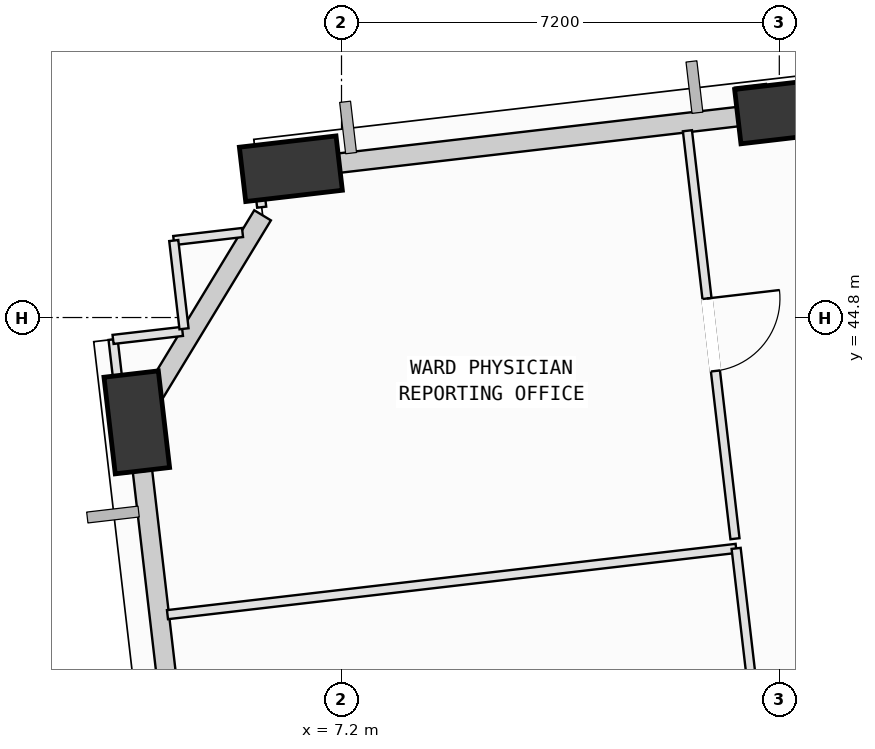
"""IFC4 building model, lengths in metres.
Left out: names, types, materials, properties, quantities, classifications, styles, units other than length and angle.
Written with IfcOpenShell. Run it as: python <this file> out.ifc"""

import sys

from ifc_helpers import new_model, si_unit, direction, frame, frame_2d, origin, origin_2d, place, context, subcontext, project, spatial, rectangle, extrude, element, fill, save


model = new_model("IFC4")
c1 = context("Model", 3, precision=1e-05, world=origin(), true_north=direction((0.0, 1.0)))
c2 = subcontext(c1, "Body", "Model", "MODEL_VIEW")
j1 = project(units=[si_unit("LENGTHUNIT", "METRE"), si_unit("PLANEANGLEUNIT", "RADIAN")], contexts=[c1])
p1 = place(None, origin())
s1 = spatial("IfcSite", under=j1, at=p1, CompositionType="ELEMENT")
p2 = place(p1, origin())
s2 = spatial("IfcBuilding", under=s1, at=p2, CompositionType="ELEMENT")
p3 = place(p2, frame((0.0, 0.0, 51.0)))
s3 = spatial("IfcBuildingStorey", under=s2, at=p3, CompositionType="ELEMENT", Elevation=51.0)
p4 = place(p3, frame((14.512, 48.197, 0.002), z_axis=(-0.095588978911, -0.079283693352, 0.992258455786), x_axis=(0.722555490387, -0.691163316507, 0.014381697639)))
e1 = element("IfcColumn", 1, at=p4, inside=s3, PredefinedType="COLUMN", context=c2, shape_type="SweptSolid", body=[
    extrude(rectangle(XDim=1.6, YDim=0.9, at=origin_2d()), origin(), (0.0, 0.0, 1.0), 4.028),
])
p5 = place(p3, frame((6.367, 47.247, 0.002), z_axis=(-0.091149766774, -0.112426104907, 0.989470611465), x_axis=(0.843714251314, -0.536530836824, 0.016760765699)))
e2 = element("IfcColumn", 2, at=p5, inside=s3, PredefinedType="COLUMN", context=c2, shape_type="SweptSolid", body=[
    extrude(rectangle(XDim=1.6, YDim=0.9, at=origin_2d()), origin(), (0.0, 0.0, 1.0), 4.039),
])
p6 = place(p3, frame((3.833, 43.076, 0.002), z_axis=(-0.073999121688, -0.122727301492, 0.989677795779), x_axis=(0.408416071098, 0.901628458186, 0.142346184554)))
e3 = element("IfcColumn", 3, at=p6, inside=s3, PredefinedType="COLUMN", context=c2, shape_type="SweptSolid", body=[
    extrude(rectangle(XDim=1.6, YDim=0.9, at=origin_2d()), origin(), (0.0, 0.0, 1.0), 4.038),
])
p7 = place(p3, frame((6.728, 47.289, 0.0), z_axis=(0.0, 0.0, 1.0), x_axis=(0.993271125932, 0.115812220379, 0.0)))
e4 = element("IfcWall", 4, at=p7, inside=s3, PredefinedType="SOLIDWALL", context=c2, shape_type="SweptSolid", body=[
    extrude(rectangle(XDim=7.035, YDim=0.32, at=frame_2d((3.517, 0.0))), origin(), (0.0, 0.0, 1.0), 3.165),
])
p8 = place(p3, frame((3.999, 43.348, 0.0), z_axis=(0.0, 0.0, 1.0), x_axis=(0.519169277359, 0.85467143479, 0.0)))
e5 = element("IfcWall", 5, at=p8, inside=s3, PredefinedType="SOLIDWALL", context=c2, shape_type="SweptSolid", body=[
    extrude(rectangle(XDim=3.666, YDim=0.32, at=frame_2d((1.833, 0.0))), origin(), (0.0, 0.0, 1.0), 3.165),
])
p9 = place(p3, frame((4.532, 37.083, 0.0), z_axis=(0.0, 0.0, 1.0), x_axis=(-0.11578615957, 0.993274164192, 0.0)))
e6 = element("IfcWall", 6, at=p9, inside=s3, PredefinedType="SOLIDWALL", context=c2, shape_type="SweptSolid", body=[
    extrude(rectangle(XDim=5.223, YDim=0.32, at=frame_2d((2.611, 0.0))), origin(), (0.0, 0.0, 1.0), 3.165),
])
p10 = place(p9, frame((0.715, 0.0, 0.75)))
e7 = element("IfcOpeningElement", 7, at=p10, cuts=e6, PredefinedType="OPENING", context=c2, shape_type="SweptSolid", body=[
    extrude(rectangle(XDim=1.2, YDim=1.75, at=frame_2d((0.6, 0.875))), frame((0.0, 0.17, 0.0), z_axis=(0.0, -1.0, 0.0), x_axis=(1.0, 0.0, 0.0)), (0.0, 0.0, 1.0), 0.34),
])
p11 = place(p3, frame((4.338, 39.913, 0.0), z_axis=(0.0, 0.0, 1.0), x_axis=(0.993278152999, 0.11575193638, 0.0)))
e8 = element("IfcWall", 8, at=p11, inside=s3, PredefinedType="PARTITIONING", context=c2, shape_type="SweptSolid", body=[
    extrude(rectangle(XDim=9.415, YDim=0.15, at=frame_2d((4.708, 0.0))), origin(), (0.0, 0.0, 1.0), 3.78),
])
p12 = place(p3, frame((13.69, 41.003, 0.0), z_axis=(0.0, 0.0, 1.0), x_axis=(0.11578306798, -0.993274524575, 0.0)))
e9 = element("IfcWall", 9, at=p12, inside=s3, PredefinedType="PARTITIONING", context=c2, shape_type="SweptSolid", body=[
    extrude(rectangle(XDim=13.24, YDim=0.15, at=frame_2d((6.62, 0.0))), origin(), (0.0, 0.0, 1.0), 2.865),
])
p13 = place(p12, frame((6.02, 0.0, 0.0)))
e10 = element("IfcOpeningElement", 10, at=p13, cuts=e9, PredefinedType="OPENING", context=c2, shape_type="SweptSolid", body=[
    extrude(rectangle(XDim=1.2, YDim=2.15, at=frame_2d((0.6, 1.075))), frame((0.0, 0.085, 0.0), z_axis=(0.0, -1.0, 0.0), x_axis=(1.0, 0.0, 0.0)), (0.0, 0.0, 1.0), 0.17),
])
p14 = place(p3, frame((4.441, 46.066, 0.0), z_axis=(0.0, 0.0, 1.0), x_axis=(0.993251207163, 0.115982927493, 0.0)))
e11 = element("IfcWall", 11, at=p14, inside=s3, PredefinedType="PARTITIONING", context=c2, shape_type="SweptSolid", body=[
    extrude(rectangle(XDim=1.139, YDim=0.15, at=frame_2d((0.569, 0.0))), origin(), (0.0, 0.0, 1.0), 3.78),
])
p15 = place(p3, frame((5.887, 46.615, 0.0), z_axis=(0.0, 0.0, 1.0), x_axis=(-0.115659183941, 0.99328895754, 0.0)))
e12 = element("IfcWall", 12, at=p15, inside=s3, PredefinedType="PARTITIONING", context=c2, shape_type="SweptSolid", body=[
    extrude(rectangle(XDim=0.743, YDim=0.15, at=frame_2d((0.372, 0.0))), origin(), (0.0, 0.0, 1.0), 3.78),
])
p16 = place(p3, frame((5.801, 47.353, 0.0), z_axis=(0.0, 0.0, 1.0), x_axis=(0.993245176119, 0.116034564316, 0.0)))
e13 = element("IfcWall", 13, at=p16, inside=s3, PredefinedType="PARTITIONING", context=c2, shape_type="SweptSolid", body=[
    extrude(rectangle(XDim=0.913, YDim=0.15, at=frame_2d((0.457, 0.0))), origin(), (0.0, 0.0, 1.0), 3.78),
])
p17 = place(p3, frame((12.889, 47.872, 0.0), z_axis=(0.0, 0.0, 1.0), x_axis=(0.115757094982, -0.993277551826, 0.0)))
e14 = element("IfcWall", 14, at=p17, inside=s3, PredefinedType="PARTITIONING", context=c2, shape_type="SweptSolid", body=[
    extrude(rectangle(XDim=6.755, YDim=0.15, at=frame_2d((3.378, 0.0))), origin(), (0.0, 0.0, 1.0), 2.865),
])
p18 = place(p17, frame((2.778, 0.0, 0.0)))
e15 = element("IfcOpeningElement", 15, at=p18, cuts=e14, PredefinedType="OPENING", context=c2, shape_type="SweptSolid", body=[
    extrude(rectangle(XDim=1.2, YDim=2.15, at=frame_2d((0.6, 1.075))), frame((0.0, 0.085, 0.0), z_axis=(0.0, -1.0, 0.0), x_axis=(1.0, 0.0, 0.0)), (0.0, 0.0, 1.0), 0.17),
])
p19 = place(p3, frame((3.699, 42.244, 0.0), z_axis=(0.0, 0.0, 1.0), x_axis=(-0.115726362129, 0.993281132967, 0.0)))
e16 = element("IfcWall", 16, at=p19, inside=s3, PredefinedType="PARTITIONING", context=c2, shape_type="SweptSolid", body=[
    extrude(rectangle(XDim=2.211, YDim=0.15, at=frame_2d((1.105, 0.0))), origin(), (0.0, 0.0, 1.0), 3.165),
])
p20 = place(p3, frame((3.443, 44.44, 0.0), z_axis=(0.0, 0.0, 1.0), x_axis=(0.993365107082, 0.115003321834, 0.0)))
e17 = element("IfcWall", 17, at=p20, inside=s3, PredefinedType="PARTITIONING", context=c2, shape_type="SweptSolid", body=[
    extrude(rectangle(XDim=1.148, YDim=0.15, at=frame_2d((0.574, 0.0))), origin(), (0.0, 0.0, 1.0), 3.78),
])
p21 = place(p3, frame((4.61, 44.615, 0.0), z_axis=(0.0, 0.0, 1.0), x_axis=(-0.115822988416, 0.993269870355, 0.0)))
e18 = element("IfcWall", 18, at=p21, inside=s3, PredefinedType="PARTITIONING", context=c2, shape_type="SweptSolid", body=[
    extrude(rectangle(XDim=1.461, YDim=0.15, at=frame_2d((0.73, 0.0))), origin(), (0.0, 0.0, 1.0), 3.78),
])
p22 = place(p18, origin())
e19 = element("IfcDoor", 19, at=p22, inside=s3, OperationType="SINGLE_SWING_LEFT", PredefinedType="DOOR", context=c2, shape_type="SweptSolid", body=[
    extrude(rectangle(XDim=1.2, YDim=2.15, at=frame_2d((0.6, 1.075))), frame((0.0, 0.025, 0.0), z_axis=(0.0, -1.0, 0.0), x_axis=(1.0, 0.0, 0.0)), (0.0, 0.0, 1.0), 0.05),
])
fill(e15, e19)
save(model, sys.argv[1])
